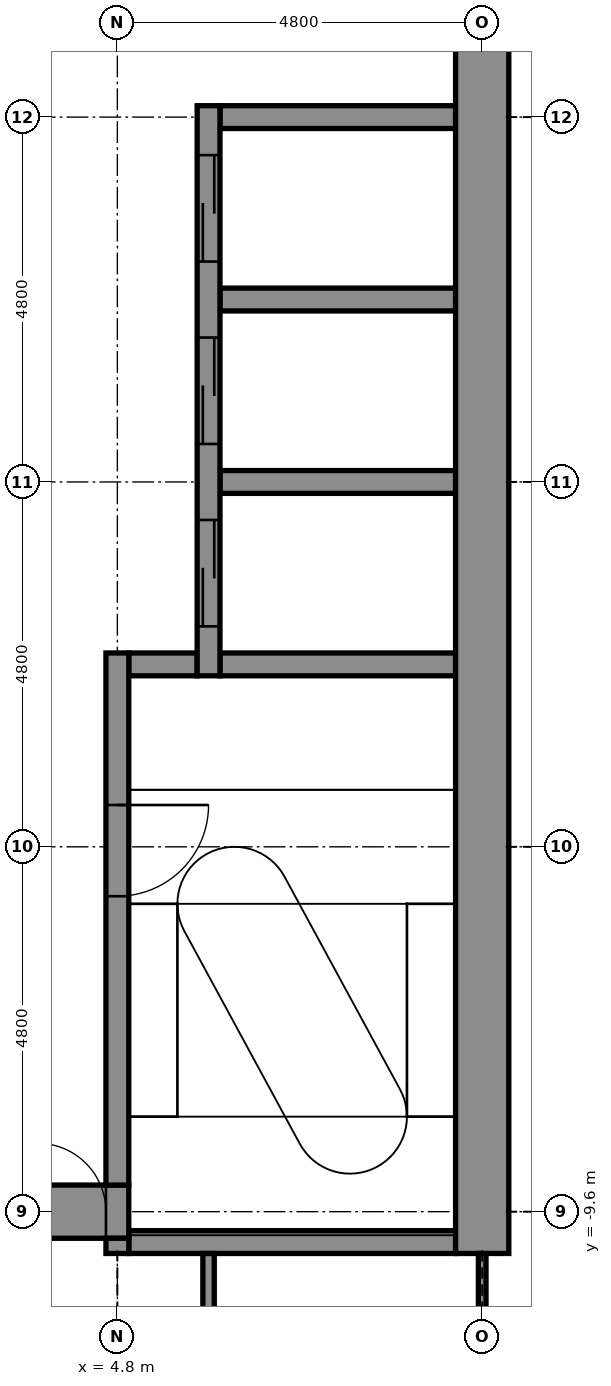
"""IFC4 building model, lengths in metres.
Left out: names, types, materials, properties, quantities, classifications, styles, units other than length and angle.
Written with IfcOpenShell. Run it as: python <this file> out.ifc"""

import sys

from ifc_helpers import new_model, si_unit, direction, frame, frame_2d, origin, place, context, subcontext, project, spatial, rectangle, extrude, element, fill, save


model = new_model("IFC4")
c1 = context("Model", 3, precision=1e-05, world=origin(), true_north=direction((0.0, 1.0)))
c2 = subcontext(c1, "Body", "Model", "MODEL_VIEW")
j1 = project(units=[si_unit("LENGTHUNIT", "METRE"), si_unit("PLANEANGLEUNIT", "RADIAN")], contexts=[c1])
p1 = place(None, origin())
s1 = spatial("IfcSite", under=j1, at=p1, CompositionType="ELEMENT")
p2 = place(p1, origin())
s2 = spatial("IfcBuilding", under=s1, at=p2, CompositionType="ELEMENT")
p3 = place(p2, frame((0.0, 0.0, 201.2)))
s3 = spatial("IfcBuildingStorey", under=s2, at=p3, CompositionType="ELEMENT", Elevation=201.2)
p4 = place(p3, frame((4.95, -10.0, -0.15), z_axis=(0.0, 0.0, 1.0), x_axis=(1.0, 0.0, 0.0)))
e1 = element("IfcWall", 1, at=p4, inside=s3, PredefinedType="STANDARD", context=c2, shape_type="SweptSolid", body=[
    extrude(rectangle(XDim=4.3, YDim=0.3, at=frame_2d((2.15, 0.0))), origin(), (0.0, 0.0, 1.0), 3.9),
])
p5 = place(p3, frame((-5.25, -9.6, -0.15), z_axis=(0.0, 0.0, 1.0), x_axis=(1.0, 0.0, 0.0)))
e2 = element("IfcWall", 2, at=p5, inside=s3, PredefinedType="SHEAR", context=c2, shape_type="SweptSolid", body=[
    extrude(rectangle(XDim=10.2, YDim=0.7, at=frame_2d((5.1, 0.0))), origin(), (0.0, 0.0, 1.0), 3.9),
])
p6 = place(p5, frame((9.0, 0.0, 0.15)))
e3 = element("IfcOpeningElement", 3, at=p6, cuts=e2, PredefinedType="OPENING", context=c2, shape_type="SweptSolid", body=[
    extrude(rectangle(XDim=0.9, YDim=2.1, at=frame_2d((0.45, 1.05))), frame((0.0, 0.36, 0.0), z_axis=(0.0, -1.0, 0.0), x_axis=(1.0, 0.0, 0.0)), (0.0, 0.0, 1.0), 0.72),
])
p7 = place(p3, frame((4.95, -2.4, -0.15), z_axis=(0.0, 0.0, 1.0), x_axis=(1.0, 0.0, 0.0)))
e4 = element("IfcWall", 4, at=p7, inside=s3, PredefinedType="STANDARD", context=c2, shape_type="SweptSolid", body=[
    extrude(rectangle(XDim=0.9, YDim=0.3, at=frame_2d((0.45, 0.0))), origin(), (0.0, 0.0, 1.0), 3.9),
])
for number, where, z_axis, x_axis in (
    (5, (6.15, -2.4, -0.15), (0.0, 0.0, 1.0), (1.0, 0.0, 0.0)),
    (6, (6.15, 0.0, -0.15), (0.0, 0.0, 1.0), (1.0, 0.0, 0.0)),
    (7, (6.15, 2.4, -0.15), (0.0, 0.0, 1.0), (1.0, 0.0, 0.0)),
    (8, (6.15, 4.8, -0.15), (0.0, 0.0, 1.0), (1.0, 0.0, 0.0)),
):
    element("IfcWall", number, at=place(p3, frame(where, z_axis=z_axis, x_axis=x_axis)), inside=s3, PredefinedType="STANDARD", context=c2, shape_type="SweptSolid", body=[
        extrude(rectangle(XDim=3.1, YDim=0.3, at=frame_2d((1.55, 0.0))), origin(), (0.0, 0.0, 1.0), 3.9),
    ])
p8 = place(p3, frame((4.8, -10.15, -0.15), z_axis=(0.0, 0.0, 1.0), x_axis=(0.0, 1.0, 0.0)))
e9 = element("IfcWall", 9, at=p8, inside=s3, PredefinedType="STANDARD", context=c2, shape_type="SweptSolid", body=[
    extrude(rectangle(XDim=0.2, YDim=0.3, at=frame_2d((0.1, 0.0))), origin(), (0.0, 0.0, 1.0), 3.9),
])
p9 = place(p3, frame((4.8, -9.25, -0.15), z_axis=(0.0, 0.0, 1.0), x_axis=(0.0, 1.0, 0.0)))
e10 = element("IfcWall", 10, at=p9, inside=s3, PredefinedType="STANDARD", context=c2, shape_type="SweptSolid", body=[
    extrude(rectangle(XDim=7.0, YDim=0.3, at=frame_2d((3.5, 0.0))), origin(), (0.0, 0.0, 1.0), 3.9),
])
p10 = place(p9, frame((3.8, 0.0, 0.15)))
e11 = element("IfcOpeningElement", 11, at=p10, cuts=e10, PredefinedType="OPENING", context=c2, shape_type="SweptSolid", body=[
    extrude(rectangle(XDim=1.2, YDim=2.1, at=frame_2d((0.6, 1.05))), frame((0.0, 0.16, 0.0), z_axis=(0.0, -1.0, 0.0), x_axis=(1.0, 0.0, 0.0)), (0.0, 0.0, 1.0), 0.32),
])
p11 = place(p3, frame((6.0, -2.55, -0.15), z_axis=(0.0, 0.0, 1.0), x_axis=(0.0, 1.0, 0.0)))
e12 = element("IfcWall", 12, at=p11, inside=s3, PredefinedType="STANDARD", context=c2, shape_type="SweptSolid", body=[
    extrude(rectangle(XDim=7.5, YDim=0.3, at=frame_2d((3.75, 0.0))), origin(), (0.0, 0.0, 1.0), 3.9),
])
p12 = place(p11, frame((0.65, 0.0, 0.15)))
e13 = element("IfcOpeningElement", 13, at=p12, cuts=e12, PredefinedType="OPENING", context=c2, shape_type="SweptSolid", body=[
    extrude(rectangle(XDim=1.4, YDim=2.1, at=frame_2d((0.7, 1.05))), frame((0.0, 0.16, 0.0), z_axis=(0.0, -1.0, 0.0), x_axis=(1.0, 0.0, 0.0)), (0.0, 0.0, 1.0), 0.32),
])
p13 = place(p11, frame((3.05, 0.0, 0.15)))
e14 = element("IfcOpeningElement", 14, at=p13, cuts=e12, PredefinedType="OPENING", context=c2, shape_type="SweptSolid", body=[
    extrude(rectangle(XDim=1.4, YDim=2.1, at=frame_2d((0.7, 1.05))), frame((0.0, 0.16, 0.0), z_axis=(0.0, -1.0, 0.0), x_axis=(1.0, 0.0, 0.0)), (0.0, 0.0, 1.0), 0.32),
])
p14 = place(p11, frame((5.45, 0.0, 0.15)))
e15 = element("IfcOpeningElement", 15, at=p14, cuts=e12, PredefinedType="OPENING", context=c2, shape_type="SweptSolid", body=[
    extrude(rectangle(XDim=1.4, YDim=2.1, at=frame_2d((0.7, 1.05))), frame((0.0, 0.16, 0.0), z_axis=(0.0, -1.0, 0.0), x_axis=(1.0, 0.0, 0.0)), (0.0, 0.0, 1.0), 0.32),
])
p15 = place(p3, frame((9.6, -10.15, -0.15), z_axis=(0.0, 0.0, 1.0), x_axis=(0.0, 1.0, 0.0)))
e16 = element("IfcWall", 16, at=p15, inside=s3, PredefinedType="SHEAR", context=c2, shape_type="SweptSolid", body=[
    extrude(rectangle(XDim=20.1, YDim=0.7, at=frame_2d((10.05, 0.0))), origin(), (0.0, 0.0, 1.0), 3.9),
])
p16 = place(p3, frame((9.6, -14.441, 0.0), z_axis=(0.0, 0.0, 1.0), x_axis=(0.0, 1.0, 0.0)))
e17 = element("IfcWall", 17, at=p16, inside=s3, PredefinedType="PARTITIONING", context=c2, shape_type="SweptSolid", body=[
    extrude(rectangle(XDim=4.292, YDim=0.1, at=frame_2d((2.146, 0.0))), origin(), (0.0, 0.0, 1.0), 3.066),
])
p17 = place(p3, frame((6.0, -14.441, 0.0), z_axis=(0.0, 0.0, 1.0), x_axis=(0.0, 1.0, 0.0)))
e18 = element("IfcWall", 18, at=p17, inside=s3, PredefinedType="PARTITIONING", context=c2, shape_type="SweptSolid", body=[
    extrude(rectangle(XDim=4.292, YDim=0.15, at=frame_2d((2.146, 0.0))), origin(), (0.0, 0.0, 1.0), 3.75),
])
p18 = place(p17, frame((1.771, 0.0, 0.0)))
e19 = element("IfcOpeningElement", 19, at=p18, cuts=e18, PredefinedType="OPENING", context=c2, shape_type="SweptSolid", body=[
    extrude(rectangle(XDim=0.9, YDim=2.1, at=frame_2d((0.45, 1.05))), frame((0.0, 0.085, 0.0), z_axis=(0.0, -1.0, 0.0), x_axis=(1.0, 0.0, 0.0)), (0.0, 0.0, 1.0), 0.17),
])
p19 = place(p12, origin())
e20 = element("IfcDoor", 20, at=p19, inside=s3, OperationType="DOUBLE_DOOR_SLIDING", PredefinedType="DOOR", context=c2, shape_type="SweptSolid", body=[
    extrude(rectangle(XDim=1.4, YDim=2.1, at=frame_2d((0.7, 1.05))), frame((0.0, 0.025, 0.0), z_axis=(0.0, -1.0, 0.0), x_axis=(1.0, 0.0, 0.0)), (0.0, 0.0, 1.0), 0.05),
])
fill(e13, e20)
p20 = place(p13, origin())
e21 = element("IfcDoor", 21, at=p20, inside=s3, OperationType="DOUBLE_DOOR_SLIDING", PredefinedType="DOOR", context=c2, shape_type="SweptSolid", body=[
    extrude(rectangle(XDim=1.4, YDim=2.1, at=frame_2d((0.7, 1.05))), frame((0.0, 0.025, 0.0), z_axis=(0.0, -1.0, 0.0), x_axis=(1.0, 0.0, 0.0)), (0.0, 0.0, 1.0), 0.05),
])
fill(e14, e21)
p21 = place(p14, origin())
e22 = element("IfcDoor", 22, at=p21, inside=s3, OperationType="DOUBLE_DOOR_SLIDING", PredefinedType="DOOR", context=c2, shape_type="SweptSolid", body=[
    extrude(rectangle(XDim=1.4, YDim=2.1, at=frame_2d((0.7, 1.05))), frame((0.0, 0.025, 0.0), z_axis=(0.0, -1.0, 0.0), x_axis=(1.0, 0.0, 0.0)), (0.0, 0.0, 1.0), 0.05),
])
fill(e15, e22)
p22 = place(p10, frame((1.2, 0.0, 0.0), z_axis=(0.0, 0.0, 1.0), x_axis=(-1.0, 0.0, 0.0)))
e23 = element("IfcDoor", 23, at=p22, inside=s3, OperationType="SINGLE_SWING_RIGHT", PredefinedType="DOOR", context=c2, shape_type="SweptSolid", body=[
    extrude(rectangle(XDim=1.2, YDim=2.1, at=frame_2d((0.6, 1.05))), frame((0.0, 0.025, 0.0), z_axis=(0.0, -1.0, 0.0), x_axis=(1.0, 0.0, 0.0)), (0.0, 0.0, 1.0), 0.05),
])
fill(e11, e23)
p23 = place(p6, origin())
e24 = element("IfcDoor", 24, at=p23, inside=s3, OperationType="SINGLE_SWING_LEFT", PredefinedType="DOOR", context=c2, shape_type="SweptSolid", body=[
    extrude(rectangle(XDim=0.9, YDim=2.1, at=frame_2d((0.45, 1.05))), frame((0.0, 0.025, 0.0), z_axis=(0.0, -1.0, 0.0), x_axis=(1.0, 0.0, 0.0)), (0.0, 0.0, 1.0), 0.05),
])
fill(e3, e24)
save(model, sys.argv[1])
